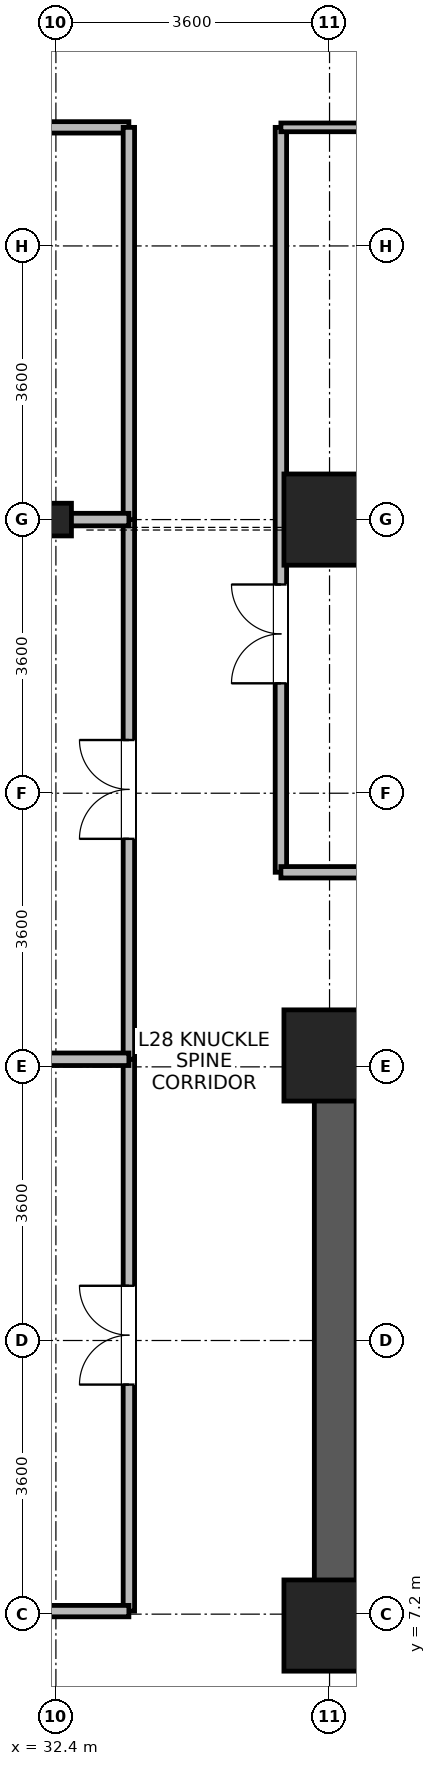
"""IFC4 building model, lengths in metres.
Left out: names, types, materials, properties, quantities, classifications, styles, units other than length and angle.
Written with IfcOpenShell. Run it as: python <this file> out.ifc"""

import sys

from ifc_helpers import new_model, si_unit, direction, frame, frame_2d, origin, origin_2d, place, context, subcontext, project, spatial, rectangle, i_section, extrude, source, transform, mapped, element, fill, save


model = new_model("IFC4")
c1 = context("Model", 3, precision=1e-05, world=origin(), true_north=direction((0.0, 1.0)))
c2 = subcontext(c1, "Body", "Model", "MODEL_VIEW")
j1 = project(units=[si_unit("LENGTHUNIT", "METRE"), si_unit("PLANEANGLEUNIT", "RADIAN")], contexts=[c1])
p1 = place(None, origin())
s1 = spatial("IfcSite", under=j1, at=p1, CompositionType="ELEMENT")
p2 = place(p1, origin())
s2 = spatial("IfcBuilding", under=s1, at=p2, CompositionType="ELEMENT")
p3 = place(p2, frame((0.0, 0.0, 111.9)))
s3 = spatial("IfcBuildingStorey", under=s2, at=p3, CompositionType="ELEMENT", Elevation=111.9)
p4 = place(p3, frame((36.075, 6.75, 0.0), z_axis=(0.0, 0.0, 1.0), x_axis=(0.0, 1.0, 0.0)))
e1 = element("IfcWall", 1, at=p4, inside=s3, PredefinedType="SHEAR", context=c2, shape_type="SweptSolid", body=[
    extrude(rectangle(XDim=8.1, YDim=0.55, at=frame_2d((4.05, 0.0))), origin(), (0.0, 0.0, 1.0), 3.45),
])
m1 = source(origin(), c2, "Body", "SweptSolid", [
    extrude(rectangle(XDim=1.2, YDim=1.2, at=origin_2d()), origin(), (0.0, 0.0, 1.0), 3.7),
])
for number, where, z_axis, x_axis in (
    (2, (36.0, 21.6, 0.0), (0.0, 0.0, 1.0), (1.0, 0.0, 0.0)),
    (3, (36.0, 7.05, 0.0), (0.0, 0.0, 1.0), (1.0, 0.0, 0.0)),
    (4, (36.0, 14.55, 0.0), (0.0, 0.0, 1.0), (1.0, 0.0, 0.0)),
):
    element("IfcColumn", number, at=place(p3, frame(where, z_axis=z_axis, x_axis=x_axis)), inside=s3, PredefinedType="COLUMN", context=c2, shape_type="MappedRepresentation", body=[
        mapped(m1, transform((0.0, 0.0, 0.0), x_axis=(1.0, 0.0, 0.0), y_axis=(0.0, 1.0, 0.0), z_axis=(0.0, 0.0, 1.0), scale=1.0)),
    ])
m2 = source(origin(), c2, "Body", "SweptSolid", [
    extrude(i_section(OverallWidth=0.409, OverallDepth=0.43, WebThickness=0.024, FlangeThickness=0.033, FilletRadius=0.015, at=origin_2d()), origin(), (0.0, 0.0, 1.0), 3.7),
])
p5 = place(p3, frame((32.4, 21.6, 0.0), z_axis=(0.0, 0.0, 1.0), x_axis=(1.0, 0.0, 0.0)))
e5 = element("IfcColumn", 5, at=p5, inside=s3, PredefinedType="COLUMN", context=c2, shape_type="MappedRepresentation", body=[
    mapped(m2, transform((0.0, 0.0, 0.0), x_axis=(1.0, 0.0, 0.0), y_axis=(0.0, 1.0, 0.0), z_axis=(0.0, 0.0, 1.0), scale=1.0)),
])
p6 = place(p3, frame((35.36, 16.96, 0.0), z_axis=(0.0, 0.0, 1.0), x_axis=(0.0, 1.0, 0.0)))
e6 = element("IfcWall", 6, at=p6, inside=s3, PredefinedType="PARTITIONING", context=c2, shape_type="SweptSolid", body=[
    extrude(rectangle(XDim=9.8, YDim=0.15, at=frame_2d((4.9, 0.0))), origin(), (0.0, 0.0, 1.0), 3.43),
])
p7 = place(p6, frame((2.486, 0.0, 0.0)))
e7 = element("IfcOpeningElement", 7, at=p7, cuts=e6, PredefinedType="OPENING", context=c2, shape_type="SweptSolid", body=[
    extrude(rectangle(XDim=1.3, YDim=2.12, at=frame_2d((0.65, 1.06))), frame((0.0, 0.085, 0.0), z_axis=(0.0, -1.0, 0.0), x_axis=(1.0, 0.0, 0.0)), (0.0, 0.0, 1.0), 0.17),
])
p8 = place(p3, frame((24.04, 26.76, 0.0), z_axis=(0.0, 0.0, 1.0), x_axis=(1.0, 0.0, 0.0)))
e8 = element("IfcWall", 8, at=p8, inside=s3, PredefinedType="PARTITIONING", context=c2, shape_type="SweptSolid", body=[
    extrude(rectangle(XDim=9.32, YDim=0.15, at=frame_2d((4.66, 0.0))), origin(), (0.0, 0.0, 1.0), 3.43),
])
p9 = place(p8, frame((4.01, 0.0, 0.0)))
e9 = element("IfcOpeningElement", 9, at=p9, cuts=e8, PredefinedType="OPENING", context=c2, shape_type="SweptSolid", body=[
    extrude(rectangle(XDim=1.3, YDim=2.12, at=frame_2d((0.65, 1.06))), frame((0.0, 0.085, 0.0), z_axis=(0.0, -1.0, 0.0), x_axis=(1.0, 0.0, 0.0)), (0.0, 0.0, 1.0), 0.17),
])
p10 = place(p3, frame((35.36, 16.96, 0.0), z_axis=(0.0, 0.0, 1.0), x_axis=(1.0, 0.0, 0.0)))
e10 = element("IfcWall", 10, at=p10, inside=s3, PredefinedType="PARTITIONING", context=c2, shape_type="SweptSolid", body=[
    extrude(rectangle(XDim=7.84, YDim=0.15, at=frame_2d((3.92, 0.0))), origin(), (0.0, 0.0, 1.0), 3.43),
])
p11 = place(p3, frame((33.36, 7.24, 0.0), z_axis=(0.0, 0.0, 1.0), x_axis=(0.0, 1.0, 0.0)))
e11 = element("IfcWall", 11, at=p11, inside=s3, PredefinedType="PARTITIONING", context=c2, shape_type="SweptSolid", body=[
    extrude(rectangle(XDim=7.26, YDim=0.15, at=frame_2d((3.63, 0.0))), origin(), (0.0, 0.0, 1.0), 3.43),
])
p12 = place(p11, frame((2.98, 0.0, 0.0)))
e12 = element("IfcOpeningElement", 12, at=p12, cuts=e11, PredefinedType="OPENING", context=c2, shape_type="SweptSolid", body=[
    extrude(rectangle(XDim=1.3, YDim=2.12, at=frame_2d((0.65, 1.06))), frame((0.0, 0.085, 0.0), z_axis=(0.0, -1.0, 0.0), x_axis=(1.0, 0.0, 0.0)), (0.0, 0.0, 1.0), 0.17),
])
p13 = place(p3, frame((33.36, 14.5, 0.0), z_axis=(0.0, 0.0, 1.0), x_axis=(0.0, 1.0, 0.0)))
e13 = element("IfcWall", 13, at=p13, inside=s3, PredefinedType="PARTITIONING", context=c2, shape_type="SweptSolid", body=[
    extrude(rectangle(XDim=7.1, YDim=0.15, at=frame_2d((3.55, 0.0))), origin(), (0.0, 0.0, 1.0), 3.43),
])
p14 = place(p13, frame((2.9, 0.0, 0.0)))
e14 = element("IfcOpeningElement", 14, at=p14, cuts=e13, PredefinedType="OPENING", context=c2, shape_type="SweptSolid", body=[
    extrude(rectangle(XDim=1.3, YDim=2.12, at=frame_2d((0.65, 1.06))), frame((0.0, 0.085, 0.0), z_axis=(0.0, -1.0, 0.0), x_axis=(1.0, 0.0, 0.0)), (0.0, 0.0, 1.0), 0.17),
])
p15 = place(p3, frame((33.36, 21.6, 0.0), z_axis=(0.0, 0.0, 1.0), x_axis=(0.0, 1.0, 0.0)))
e15 = element("IfcWall", 15, at=p15, inside=s3, PredefinedType="PARTITIONING", context=c2, shape_type="SweptSolid", body=[
    extrude(rectangle(XDim=5.16, YDim=0.15, at=frame_2d((2.58, 0.0))), origin(), (0.0, 0.0, 1.0), 3.43),
])
p16 = place(p3, frame((32.032, 7.24, 0.0), z_axis=(0.0, 0.0, 1.0), x_axis=(1.0, 0.0, 0.0)))
e16 = element("IfcWall", 16, at=p16, inside=s3, PredefinedType="PARTITIONING", context=c2, shape_type="SweptSolid", body=[
    extrude(rectangle(XDim=1.328, YDim=0.15, at=frame_2d((0.664, 0.0))), origin(), (0.0, 0.0, 1.0), 3.43),
])
p17 = place(p3, frame((35.36, 26.76, 0.0), z_axis=(0.0, 0.0, 1.0), x_axis=(1.0, 0.0, 0.0)))
e17 = element("IfcWall", 17, at=p17, inside=s3, PredefinedType="PARTITIONING", context=c2, shape_type="SweptSolid", body=[
    extrude(rectangle(XDim=7.84, YDim=0.115, at=frame_2d((3.92, 0.0))), origin(), (0.0, 0.0, 1.0), 3.43),
])
p18 = place(p3, frame((32.032, 14.5, 0.0), z_axis=(0.0, 0.0, 1.0), x_axis=(1.0, 0.0, 0.0)))
e18 = element("IfcWall", 18, at=p18, inside=s3, PredefinedType="PARTITIONING", context=c2, shape_type="SweptSolid", body=[
    extrude(rectangle(XDim=1.328, YDim=0.165, at=frame_2d((0.664, 0.0))), origin(), (0.0, 0.0, 1.0), 3.43),
])
p19 = place(p3, frame((32.032, 21.6, 0.0), z_axis=(0.0, 0.0, 1.0), x_axis=(1.0, 0.0, 0.0)))
e19 = element("IfcWall", 19, at=p19, inside=s3, PredefinedType="PARTITIONING", context=c2, shape_type="SweptSolid", body=[
    extrude(rectangle(XDim=1.328, YDim=0.165, at=frame_2d((0.664, 0.0))), origin(), (0.0, 0.0, 1.0), 2.98),
])
p20 = place(p7, origin())
e20 = element("IfcDoor", 20, at=p20, inside=s3, OperationType="DOUBLE_DOOR_SINGLE_SWING", PredefinedType="DOOR", context=c2, shape_type="SweptSolid", body=[
    extrude(rectangle(XDim=1.3, YDim=2.12, at=frame_2d((0.65, 1.06))), frame((0.0, 0.025, 0.0), z_axis=(0.0, -1.0, 0.0), x_axis=(1.0, 0.0, 0.0)), (0.0, 0.0, 1.0), 0.05),
])
fill(e7, e20)
p21 = place(p12, origin())
e21 = element("IfcDoor", 21, at=p21, inside=s3, OperationType="DOUBLE_DOOR_SINGLE_SWING", PredefinedType="DOOR", context=c2, shape_type="SweptSolid", body=[
    extrude(rectangle(XDim=1.3, YDim=2.12, at=frame_2d((0.65, 1.06))), frame((0.0, 0.025, 0.0), z_axis=(0.0, -1.0, 0.0), x_axis=(1.0, 0.0, 0.0)), (0.0, 0.0, 1.0), 0.05),
])
fill(e12, e21)
p22 = place(p14, origin())
e22 = element("IfcDoor", 22, at=p22, inside=s3, OperationType="DOUBLE_DOOR_SINGLE_SWING", PredefinedType="DOOR", context=c2, shape_type="SweptSolid", body=[
    extrude(rectangle(XDim=1.3, YDim=2.12, at=frame_2d((0.65, 1.06))), frame((0.0, 0.025, 0.0), z_axis=(0.0, -1.0, 0.0), x_axis=(1.0, 0.0, 0.0)), (0.0, 0.0, 1.0), 0.05),
])
fill(e14, e22)
save(model, sys.argv[1])
